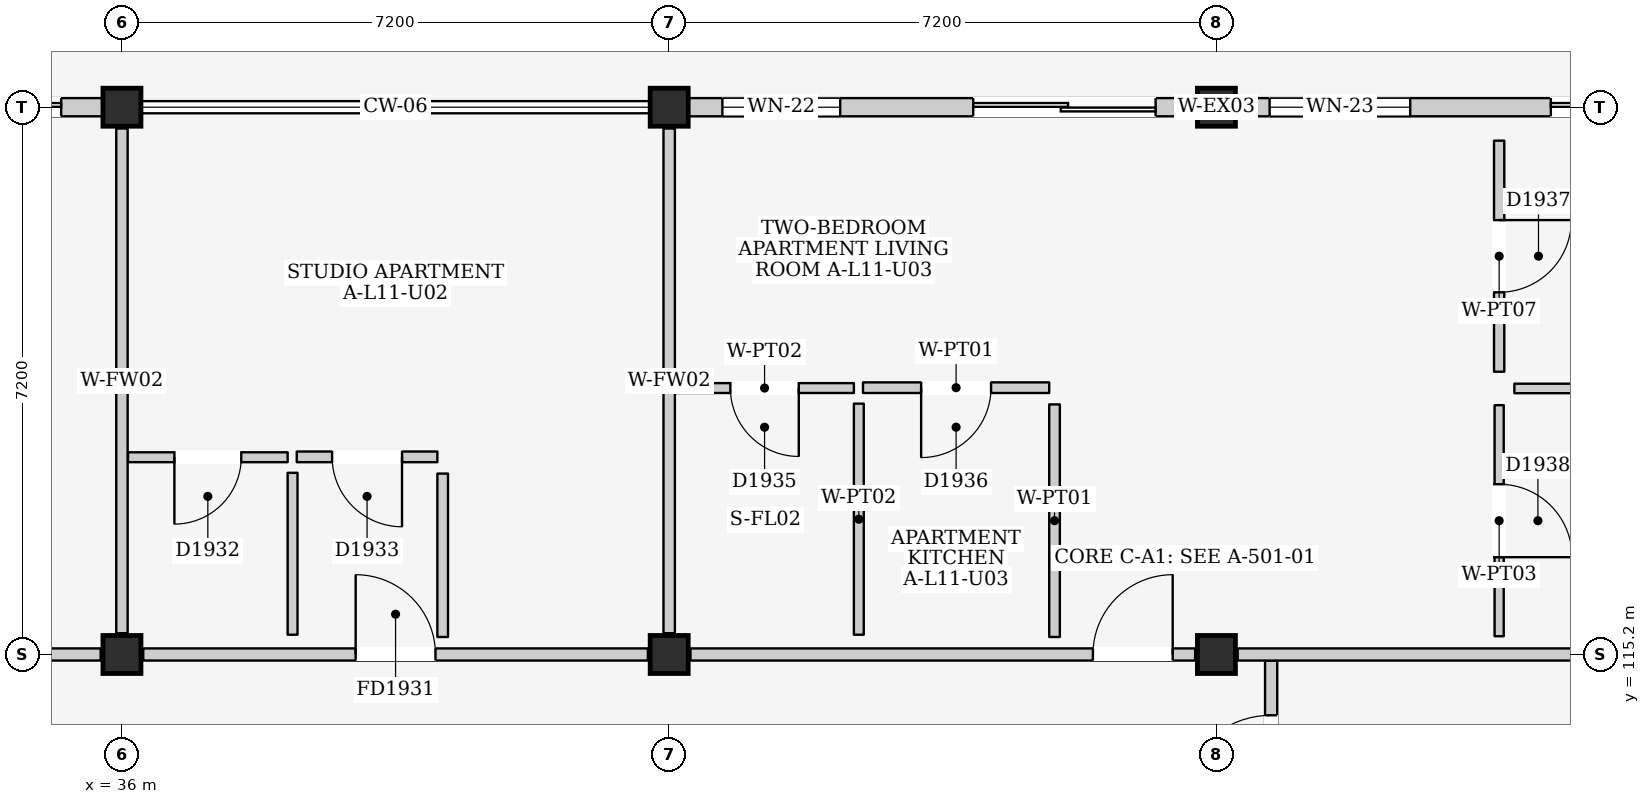
"""IFC4 building model, lengths in metres.
Left out: names, types, materials, properties, quantities, classifications, styles, units other than length and angle.
Written with IfcOpenShell. Run it as: python <this file> out.ifc"""

import sys

from ifc_helpers import new_model, si_unit, direction, frame, frame_2d, origin, origin_2d, place, context, subcontext, project, spatial, rectangle, extrude, element, fill, save


model = new_model("IFC4")
c1 = context("Model", 3, precision=1e-05, world=origin(), true_north=direction((0.0, 1.0)))
c2 = subcontext(c1, "Body", "Model", "MODEL_VIEW")
j1 = project(units=[si_unit("LENGTHUNIT", "METRE"), si_unit("PLANEANGLEUNIT", "RADIAN")], contexts=[c1])
p1 = place(None, origin())
s1 = spatial("IfcSite", under=j1, at=p1, CompositionType="ELEMENT")
p2 = place(p1, origin())
s2 = spatial("IfcBuilding", under=s1, at=p2, CompositionType="ELEMENT")
p3 = place(p2, frame((0.0, 0.0, 38.0)))
s3 = spatial("IfcBuildingStorey", under=s2, at=p3, CompositionType="ELEMENT", Elevation=38.0)
for number, where, z_axis, x_axis in (
    (1, (36.0, 115.2, 0.0), (0.0, 0.0, 1.0), (1.0, 0.0, 0.0)),
    (2, (36.0, 122.4, 0.0), (0.0, 0.0, 1.0), (1.0, 0.0, 0.0)),
    (3, (43.2, 115.2, 0.0), (0.0, 0.0, 1.0), (1.0, 0.0, 0.0)),
    (4, (43.2, 122.4, 0.0), (0.0, 0.0, 1.0), (1.0, 0.0, 0.0)),
    (5, (50.4, 115.2, 0.0), (0.0, 0.0, 1.0), (1.0, 0.0, 0.0)),
    (6, (50.4, 122.4, 0.0), (0.0, 0.0, 1.0), (1.0, 0.0, 0.0)),
):
    element("IfcColumn", number, at=place(p3, frame(where, z_axis=z_axis, x_axis=x_axis)), inside=s3, PredefinedType="COLUMN", context=c2, shape_type="SweptSolid", body=[
        extrude(rectangle(XDim=0.5, YDim=0.5, at=origin_2d()), origin(), (0.0, 0.0, 1.0), 3.2),
    ])
p4 = place(p3, frame((29.05, 122.4, 0.0), z_axis=(0.0, 0.0, 1.0), x_axis=(1.0, 0.0, 0.0)))
e7 = element("IfcWall", 7, at=p4, inside=s3, PredefinedType="ELEMENTEDWALL", context=c2, shape_type="SweptSolid", body=[
    extrude(rectangle(XDim=6.7, YDim=0.24, at=frame_2d((3.35, 0.0))), origin(), (0.0, 0.0, 1.0), 2.525),
])
p5 = place(p4, frame((4.55, 0.0, 0.0)))
e8 = element("IfcOpeningElement", 8, at=p5, cuts=e7, PredefinedType="OPENING", context=c2, shape_type="SweptSolid", body=[
    extrude(rectangle(XDim=1.6, YDim=2.12, at=frame_2d((0.8, 1.06))), frame((0.0, 0.135, 0.0), z_axis=(0.0, -1.0, 0.0), x_axis=(1.0, 0.0, 0.0)), (0.0, 0.0, 1.0), 0.27),
])
p6 = place(p4, frame((0.45, 0.0, 0.9)))
e9 = element("IfcOpeningElement", 9, at=p6, cuts=e7, PredefinedType="OPENING", context=c2, shape_type="SweptSolid", body=[
    extrude(rectangle(XDim=1.15, YDim=1.15, at=frame_2d((0.575, 0.575))), frame((0.0, 0.135, 0.0), z_axis=(0.0, -1.0, 0.0), x_axis=(1.0, 0.0, 0.0)), (0.0, 0.0, 1.0), 0.27),
])
p7 = place(p3, frame((43.45, 122.4, 0.0), z_axis=(0.0, 0.0, 1.0), x_axis=(1.0, 0.0, 0.0)))
e10 = element("IfcWall", 10, at=p7, inside=s3, PredefinedType="ELEMENTEDWALL", context=c2, shape_type="SweptSolid", body=[
    extrude(rectangle(XDim=6.7, YDim=0.24, at=frame_2d((3.35, 0.0))), origin(), (0.0, 0.0, 1.0), 2.525),
])
p8 = place(p7, frame((3.75, 0.0, 0.0)))
e11 = element("IfcOpeningElement", 11, at=p8, cuts=e10, PredefinedType="OPENING", context=c2, shape_type="SweptSolid", body=[
    extrude(rectangle(XDim=2.4, YDim=2.12, at=frame_2d((1.2, 1.06))), frame((0.0, 0.135, 0.0), z_axis=(0.0, -1.0, 0.0), x_axis=(1.0, 0.0, 0.0)), (0.0, 0.0, 1.0), 0.27),
])
p9 = place(p7, frame((0.45, 0.0, 0.9)))
e12 = element("IfcOpeningElement", 12, at=p9, cuts=e10, PredefinedType="OPENING", context=c2, shape_type="SweptSolid", body=[
    extrude(rectangle(XDim=1.55, YDim=1.45, at=frame_2d((0.775, 0.725))), frame((0.0, 0.135, 0.0), z_axis=(0.0, -1.0, 0.0), x_axis=(1.0, 0.0, 0.0)), (0.0, 0.0, 1.0), 0.27),
])
p10 = place(p3, frame((50.65, 122.4, 0.0), z_axis=(0.0, 0.0, 1.0), x_axis=(1.0, 0.0, 0.0)))
e13 = element("IfcWall", 13, at=p10, inside=s3, PredefinedType="ELEMENTEDWALL", context=c2, shape_type="SweptSolid", body=[
    extrude(rectangle(XDim=6.7, YDim=0.24, at=frame_2d((3.35, 0.0))), origin(), (0.0, 0.0, 1.0), 2.525),
])
p11 = place(p10, frame((4.15, 0.0, 0.0)))
e14 = element("IfcOpeningElement", 14, at=p11, cuts=e13, PredefinedType="OPENING", context=c2, shape_type="SweptSolid", body=[
    extrude(rectangle(XDim=2.0, YDim=2.12, at=frame_2d((1.0, 1.06))), frame((0.0, 0.135, 0.0), z_axis=(0.0, -1.0, 0.0), x_axis=(1.0, 0.0, 0.0)), (0.0, 0.0, 1.0), 0.27),
])
p12 = place(p10, frame((0.45, 0.0, 0.9)))
e15 = element("IfcOpeningElement", 15, at=p12, cuts=e13, PredefinedType="OPENING", context=c2, shape_type="SweptSolid", body=[
    extrude(rectangle(XDim=1.85, YDim=1.4, at=frame_2d((0.925, 0.7))), frame((0.0, 0.135, 0.0), z_axis=(0.0, -1.0, 0.0), x_axis=(1.0, 0.0, 0.0)), (0.0, 0.0, 1.0), 0.27),
])
p13 = place(p3, frame((51.12, 111.1, 0.0), z_axis=(0.0, 0.0, 1.0), x_axis=(0.0, 1.0, 0.0)))
e16 = element("IfcWall", 16, at=p13, inside=s3, PredefinedType="PARTITIONING", context=c2, shape_type="SweptSolid", body=[
    extrude(rectangle(XDim=4.02, YDim=0.16, at=frame_2d((2.01, 0.0))), origin(), (0.0, 0.0, 1.0), 2.99),
])
p14 = place(p13, frame((2.1, 0.0, 0.0)))
e17 = element("IfcOpeningElement", 17, at=p14, cuts=e16, PredefinedType="OPENING", context=c2, shape_type="SweptSolid", body=[
    extrude(rectangle(XDim=1.2, YDim=2.2, at=frame_2d((0.6, 1.1))), frame((0.0, 0.095, 0.0), z_axis=(0.0, -1.0, 0.0), x_axis=(1.0, 0.0, 0.0)), (0.0, 0.0, 1.0), 0.19),
])
p15 = place(p3, frame((29.08, 115.2, 0.0), z_axis=(0.0, 0.0, 1.0), x_axis=(1.0, 0.0, 0.0)))
e18 = element("IfcWall", 18, at=p15, inside=s3, PredefinedType="PARTITIONING", context=c2, shape_type="SweptSolid", body=[
    extrude(rectangle(XDim=6.64, YDim=0.16, at=frame_2d((3.32, 0.0))), origin(), (0.0, 0.0, 1.0), 2.325),
])
p16 = place(p15, frame((2.795, 0.0, 0.0)))
e19 = element("IfcOpeningElement", 19, at=p16, cuts=e18, PredefinedType="OPENING", context=c2, shape_type="SweptSolid", body=[
    extrude(rectangle(XDim=1.05, YDim=2.15, at=frame_2d((0.525, 1.075))), frame((0.0, 0.095, 0.0), z_axis=(0.0, -1.0, 0.0), x_axis=(1.0, 0.0, 0.0)), (0.0, 0.0, 1.0), 0.19),
])
p17 = place(p3, frame((36.0, 115.48, 0.0), z_axis=(0.0, 0.0, 1.0), x_axis=(0.0, 1.0, 0.0)))
e20 = element("IfcWall", 20, at=p17, inside=s3, PredefinedType="PARTITIONING", context=c2, shape_type="SweptSolid", body=[
    extrude(rectangle(XDim=6.64, YDim=0.15, at=frame_2d((3.32, 0.0))), origin(), (0.0, 0.0, 1.0), 2.475),
])
p18 = place(p3, frame((36.28, 115.2, 0.0), z_axis=(0.0, 0.0, 1.0), x_axis=(1.0, 0.0, 0.0)))
e21 = element("IfcWall", 21, at=p18, inside=s3, PredefinedType="PARTITIONING", context=c2, shape_type="SweptSolid", body=[
    extrude(rectangle(XDim=6.64, YDim=0.16, at=frame_2d((3.32, 0.0))), origin(), (0.0, 0.0, 1.0), 2.325),
])
p19 = place(p18, frame((2.795, 0.0, 0.0)))
e22 = element("IfcOpeningElement", 22, at=p19, cuts=e21, PredefinedType="OPENING", context=c2, shape_type="SweptSolid", body=[
    extrude(rectangle(XDim=1.05, YDim=2.15, at=frame_2d((0.525, 1.075))), frame((0.0, 0.095, 0.0), z_axis=(0.0, -1.0, 0.0), x_axis=(1.0, 0.0, 0.0)), (0.0, 0.0, 1.0), 0.19),
])
p20 = place(p3, frame((43.2, 115.48, 0.0), z_axis=(0.0, 0.0, 1.0), x_axis=(0.0, 1.0, 0.0)))
e23 = element("IfcWall", 23, at=p20, inside=s3, PredefinedType="PARTITIONING", context=c2, shape_type="SweptSolid", body=[
    extrude(rectangle(XDim=6.64, YDim=0.15, at=frame_2d((3.32, 0.0))), origin(), (0.0, 0.0, 1.0), 2.475),
])
p21 = place(p3, frame((36.08, 117.795, 0.0), z_axis=(0.0, 0.0, 1.0), x_axis=(1.0, 0.0, 0.0)))
e24 = element("IfcWall", 24, at=p21, inside=s3, PredefinedType="PARTITIONING", context=c2, shape_type="SweptSolid", body=[
    extrude(rectangle(XDim=2.1, YDim=0.13, at=frame_2d((1.05, 0.0))), origin(), (0.0, 0.0, 1.0), 2.99),
])
p22 = place(p21, frame((0.61, 0.0, 0.0)))
e25 = element("IfcOpeningElement", 25, at=p22, cuts=e24, PredefinedType="OPENING", context=c2, shape_type="SweptSolid", body=[
    extrude(rectangle(XDim=0.88, YDim=2.1, at=frame_2d((0.44, 1.05))), frame((0.0, 0.08, 0.0), z_axis=(0.0, -1.0, 0.0), x_axis=(1.0, 0.0, 0.0)), (0.0, 0.0, 1.0), 0.16),
])
p23 = place(p3, frame((38.245, 115.46, 0.0), z_axis=(0.0, 0.0, 1.0), x_axis=(0.0, 1.0, 0.0)))
e26 = element("IfcWall", 26, at=p23, inside=s3, PredefinedType="PARTITIONING", context=c2, shape_type="SweptSolid", body=[
    extrude(rectangle(XDim=2.13, YDim=0.13, at=frame_2d((1.065, 0.0))), origin(), (0.0, 0.0, 1.0), 2.99),
])
p24 = place(p3, frame((38.3, 117.8, 0.0), z_axis=(0.0, 0.0, 1.0), x_axis=(1.0, 0.0, 0.0)))
e27 = element("IfcWall", 27, at=p24, inside=s3, PredefinedType="PARTITIONING", context=c2, shape_type="SweptSolid", body=[
    extrude(rectangle(XDim=1.85, YDim=0.14, at=frame_2d((0.925, 0.0))), origin(), (0.0, 0.0, 1.0), 2.99),
])
p25 = place(p24, frame((0.465, 0.0, 0.0)))
e28 = element("IfcOpeningElement", 28, at=p25, cuts=e27, PredefinedType="OPENING", context=c2, shape_type="SweptSolid", body=[
    extrude(rectangle(XDim=0.92, YDim=2.1, at=frame_2d((0.46, 1.05))), frame((0.0, 0.085, 0.0), z_axis=(0.0, -1.0, 0.0), x_axis=(1.0, 0.0, 0.0)), (0.0, 0.0, 1.0), 0.17),
])
p26 = place(p3, frame((40.22, 115.43, 0.0), z_axis=(0.0, 0.0, 1.0), x_axis=(0.0, 1.0, 0.0)))
e29 = element("IfcWall", 29, at=p26, inside=s3, PredefinedType="PARTITIONING", context=c2, shape_type="SweptSolid", body=[
    extrude(rectangle(XDim=2.15, YDim=0.14, at=frame_2d((1.075, 0.0))), origin(), (0.0, 0.0, 1.0), 2.99),
])
p27 = place(p3, frame((43.48, 115.2, 0.0), z_axis=(0.0, 0.0, 1.0), x_axis=(1.0, 0.0, 0.0)))
e30 = element("IfcWall", 30, at=p27, inside=s3, PredefinedType="PARTITIONING", context=c2, shape_type="SweptSolid", body=[
    extrude(rectangle(XDim=6.64, YDim=0.16, at=frame_2d((3.32, 0.0))), origin(), (0.0, 0.0, 1.0), 2.325),
])
p28 = place(p27, frame((5.295, 0.0, 0.0)))
e31 = element("IfcOpeningElement", 31, at=p28, cuts=e30, PredefinedType="OPENING", context=c2, shape_type="SweptSolid", body=[
    extrude(rectangle(XDim=1.05, YDim=2.15, at=frame_2d((0.525, 1.075))), frame((0.0, 0.095, 0.0), z_axis=(0.0, -1.0, 0.0), x_axis=(1.0, 0.0, 0.0)), (0.0, 0.0, 1.0), 0.19),
])
p29 = place(p3, frame((50.68, 115.2, 0.0), z_axis=(0.0, 0.0, 1.0), x_axis=(1.0, 0.0, 0.0)))
e32 = element("IfcWall", 32, at=p29, inside=s3, PredefinedType="PARTITIONING", context=c2, shape_type="SweptSolid", body=[
    extrude(rectangle(XDim=6.64, YDim=0.16, at=frame_2d((3.32, 0.0))), origin(), (0.0, 0.0, 1.0), 2.325),
])
p30 = place(p3, frame((43.28, 118.705, 0.0), z_axis=(0.0, 0.0, 1.0), x_axis=(1.0, 0.0, 0.0)))
e33 = element("IfcWall", 33, at=p30, inside=s3, PredefinedType="PARTITIONING", context=c2, shape_type="SweptSolid", body=[
    extrude(rectangle(XDim=2.35, YDim=0.13, at=frame_2d((1.175, 0.0))), origin(), (0.0, 0.0, 1.0), 2.99),
])
p31 = place(p30, frame((0.725, 0.0, 0.0)))
e34 = element("IfcOpeningElement", 34, at=p31, cuts=e33, PredefinedType="OPENING", context=c2, shape_type="SweptSolid", body=[
    extrude(rectangle(XDim=0.9, YDim=2.1, at=frame_2d((0.45, 1.05))), frame((0.0, 0.08, 0.0), z_axis=(0.0, -1.0, 0.0), x_axis=(1.0, 0.0, 0.0)), (0.0, 0.0, 1.0), 0.16),
])
p32 = place(p3, frame((45.695, 115.46, 0.0), z_axis=(0.0, 0.0, 1.0), x_axis=(0.0, 1.0, 0.0)))
e35 = element("IfcWall", 35, at=p32, inside=s3, PredefinedType="PARTITIONING", context=c2, shape_type="SweptSolid", body=[
    extrude(rectangle(XDim=3.04, YDim=0.13, at=frame_2d((1.52, 0.0))), origin(), (0.0, 0.0, 1.0), 2.99),
])
p33 = place(p3, frame((45.75, 118.71, 0.0), z_axis=(0.0, 0.0, 1.0), x_axis=(1.0, 0.0, 0.0)))
e36 = element("IfcWall", 36, at=p33, inside=s3, PredefinedType="PARTITIONING", context=c2, shape_type="SweptSolid", body=[
    extrude(rectangle(XDim=2.45, YDim=0.14, at=frame_2d((1.225, 0.0))), origin(), (0.0, 0.0, 1.0), 2.99),
])
p34 = place(p33, frame((0.765, 0.0, 0.0)))
e37 = element("IfcOpeningElement", 37, at=p34, cuts=e36, PredefinedType="OPENING", context=c2, shape_type="SweptSolid", body=[
    extrude(rectangle(XDim=0.92, YDim=2.1, at=frame_2d((0.46, 1.05))), frame((0.0, 0.085, 0.0), z_axis=(0.0, -1.0, 0.0), x_axis=(1.0, 0.0, 0.0)), (0.0, 0.0, 1.0), 0.17),
])
p35 = place(p3, frame((48.27, 115.43, 0.0), z_axis=(0.0, 0.0, 1.0), x_axis=(0.0, 1.0, 0.0)))
e38 = element("IfcWall", 38, at=p35, inside=s3, PredefinedType="PARTITIONING", context=c2, shape_type="SweptSolid", body=[
    extrude(rectangle(XDim=3.06, YDim=0.14, at=frame_2d((1.53, 0.0))), origin(), (0.0, 0.0, 1.0), 2.99),
])
p36 = place(p3, frame((54.12, 118.92, 0.0), z_axis=(0.0, 0.0, 1.0), x_axis=(0.0, 1.0, 0.0)))
e39 = element("IfcWall", 39, at=p36, inside=s3, PredefinedType="PARTITIONING", context=c2, shape_type="SweptSolid", body=[
    extrude(rectangle(XDim=3.04, YDim=0.135, at=frame_2d((1.52, 0.0))), origin(), (0.0, 0.0, 1.0), 2.99),
])
p37 = place(p36, frame((1.045, 0.0, 0.0)))
e40 = element("IfcOpeningElement", 40, at=p37, cuts=e39, PredefinedType="OPENING", context=c2, shape_type="SweptSolid", body=[
    extrude(rectangle(XDim=0.95, YDim=2.15, at=frame_2d((0.475, 1.075))), frame((0.0, 0.083, 0.0), z_axis=(0.0, -1.0, 0.0), x_axis=(1.0, 0.0, 0.0)), (0.0, 0.0, 1.0), 0.165),
])
p38 = place(p3, frame((54.32, 118.7, 0.0), z_axis=(0.0, 0.0, 1.0), x_axis=(1.0, 0.0, 0.0)))
e41 = element("IfcWall", 41, at=p38, inside=s3, PredefinedType="PARTITIONING", context=c2, shape_type="SweptSolid", body=[
    extrude(rectangle(XDim=3.06, YDim=0.125, at=frame_2d((1.53, 0.0))), origin(), (0.0, 0.0, 1.0), 2.99),
])
p39 = place(p3, frame((54.12, 115.44, 0.0), z_axis=(0.0, 0.0, 1.0), x_axis=(0.0, 1.0, 0.0)))
e42 = element("IfcWall", 42, at=p39, inside=s3, PredefinedType="PARTITIONING", context=c2, shape_type="SweptSolid", body=[
    extrude(rectangle(XDim=3.04, YDim=0.12, at=frame_2d((1.52, 0.0))), origin(), (0.0, 0.0, 1.0), 2.99),
])
p40 = place(p39, frame((1.04, 0.0, 0.0)))
e43 = element("IfcOpeningElement", 43, at=p40, cuts=e42, PredefinedType="OPENING", context=c2, shape_type="SweptSolid", body=[
    extrude(rectangle(XDim=0.96, YDim=2.15, at=frame_2d((0.48, 1.075))), frame((0.0, 0.075, 0.0), z_axis=(0.0, -1.0, 0.0), x_axis=(1.0, 0.0, 0.0)), (0.0, 0.0, 1.0), 0.15),
])
p41 = place(p5, frame((1.6, 0.0, 0.0), z_axis=(0.0, 0.0, 1.0), x_axis=(-1.0, 0.0, 0.0)))
e44 = element("IfcDoor", 44, at=p41, inside=s3, OperationType="SLIDING_TO_RIGHT", PredefinedType="DOOR", context=c2, shape_type="SweptSolid", body=[
    extrude(rectangle(XDim=1.6, YDim=2.12, at=frame_2d((0.8, 1.06))), frame((0.0, 0.025, 0.0), z_axis=(0.0, -1.0, 0.0), x_axis=(1.0, 0.0, 0.0)), (0.0, 0.0, 1.0), 0.05),
])
fill(e8, e44)
p42 = place(p8, frame((2.4, 0.0, 0.0), z_axis=(0.0, 0.0, 1.0), x_axis=(-1.0, 0.0, 0.0)))
e45 = element("IfcDoor", 45, at=p42, inside=s3, OperationType="DOUBLE_DOOR_SLIDING", PredefinedType="DOOR", context=c2, shape_type="SweptSolid", body=[
    extrude(rectangle(XDim=2.4, YDim=2.12, at=frame_2d((1.2, 1.06))), frame((0.0, 0.025, 0.0), z_axis=(0.0, -1.0, 0.0), x_axis=(1.0, 0.0, 0.0)), (0.0, 0.0, 1.0), 0.05),
])
fill(e11, e45)
p43 = place(p9, origin())
e46 = element("IfcWindow", 46, at=p43, inside=s3, PartitioningType="DOUBLE_PANEL_VERTICAL", PredefinedType="WINDOW", context=c2, shape_type="SweptSolid", body=[
    extrude(rectangle(XDim=1.55, YDim=1.45, at=frame_2d((0.775, 0.725))), frame((0.0, 0.03, 0.0), z_axis=(0.0, -1.0, 0.0), x_axis=(1.0, 0.0, 0.0)), (0.0, 0.0, 1.0), 0.06),
])
fill(e12, e46)
p44 = place(p11, frame((2.0, 0.0, 0.0), z_axis=(0.0, 0.0, 1.0), x_axis=(-1.0, 0.0, 0.0)))
e47 = element("IfcDoor", 47, at=p44, inside=s3, OperationType="DOUBLE_DOOR_SLIDING", PredefinedType="DOOR", context=c2, shape_type="SweptSolid", body=[
    extrude(rectangle(XDim=2.0, YDim=2.12, at=frame_2d((1.0, 1.06))), frame((0.0, 0.025, 0.0), z_axis=(0.0, -1.0, 0.0), x_axis=(1.0, 0.0, 0.0)), (0.0, 0.0, 1.0), 0.05),
])
fill(e14, e47)
p45 = place(p12, origin())
e48 = element("IfcWindow", 48, at=p45, inside=s3, PartitioningType="DOUBLE_PANEL_VERTICAL", PredefinedType="WINDOW", context=c2, shape_type="SweptSolid", body=[
    extrude(rectangle(XDim=1.85, YDim=1.4, at=frame_2d((0.925, 0.7))), frame((0.0, 0.03, 0.0), z_axis=(0.0, -1.0, 0.0), x_axis=(1.0, 0.0, 0.0)), (0.0, 0.0, 1.0), 0.06),
])
fill(e15, e48)
p46 = place(p14, origin())
e49 = element("IfcDoor", 49, at=p46, inside=s3, OperationType="SINGLE_SWING_LEFT", PredefinedType="DOOR", context=c2, shape_type="SweptSolid", body=[
    extrude(rectangle(XDim=1.2, YDim=2.2, at=frame_2d((0.6, 1.1))), frame((0.0, 0.025, 0.0), z_axis=(0.0, -1.0, 0.0), x_axis=(1.0, 0.0, 0.0)), (0.0, 0.0, 1.0), 0.05),
])
fill(e17, e49)
p47 = place(p19, origin())
e50 = element("IfcDoor", 50, at=p47, inside=s3, OperationType="SINGLE_SWING_LEFT", PredefinedType="DOOR", context=c2, shape_type="SweptSolid", body=[
    extrude(rectangle(XDim=1.05, YDim=2.15, at=frame_2d((0.525, 1.075))), frame((0.0, 0.025, 0.0), z_axis=(0.0, -1.0, 0.0), x_axis=(1.0, 0.0, 0.0)), (0.0, 0.0, 1.0), 0.05),
])
fill(e22, e50)
p48 = place(p22, frame((0.88, 0.0, 0.0), z_axis=(0.0, 0.0, 1.0), x_axis=(-1.0, 0.0, 0.0)))
e51 = element("IfcDoor", 51, at=p48, inside=s3, OperationType="SINGLE_SWING_RIGHT", PredefinedType="DOOR", context=c2, shape_type="SweptSolid", body=[
    extrude(rectangle(XDim=0.88, YDim=2.1, at=frame_2d((0.44, 1.05))), frame((0.0, 0.025, 0.0), z_axis=(0.0, -1.0, 0.0), x_axis=(1.0, 0.0, 0.0)), (0.0, 0.0, 1.0), 0.05),
])
fill(e25, e51)
p49 = place(p25, frame((0.92, 0.0, 0.0), z_axis=(0.0, 0.0, 1.0), x_axis=(-1.0, 0.0, 0.0)))
e52 = element("IfcDoor", 52, at=p49, inside=s3, OperationType="SINGLE_SWING_LEFT", PredefinedType="DOOR", context=c2, shape_type="SweptSolid", body=[
    extrude(rectangle(XDim=0.92, YDim=2.1, at=frame_2d((0.46, 1.05))), frame((0.0, 0.025, 0.0), z_axis=(0.0, -1.0, 0.0), x_axis=(1.0, 0.0, 0.0)), (0.0, 0.0, 1.0), 0.05),
])
fill(e28, e52)
p50 = place(p28, origin())
e53 = element("IfcDoor", 53, at=p50, inside=s3, OperationType="SINGLE_SWING_RIGHT", PredefinedType="DOOR", context=c2, shape_type="SweptSolid", body=[
    extrude(rectangle(XDim=1.05, YDim=2.15, at=frame_2d((0.525, 1.075))), frame((0.0, 0.025, 0.0), z_axis=(0.0, -1.0, 0.0), x_axis=(1.0, 0.0, 0.0)), (0.0, 0.0, 1.0), 0.05),
])
fill(e31, e53)
p51 = place(p31, frame((0.9, 0.0, 0.0), z_axis=(0.0, 0.0, 1.0), x_axis=(-1.0, 0.0, 0.0)))
e54 = element("IfcDoor", 54, at=p51, inside=s3, OperationType="SINGLE_SWING_LEFT", PredefinedType="DOOR", context=c2, shape_type="SweptSolid", body=[
    extrude(rectangle(XDim=0.9, YDim=2.1, at=frame_2d((0.45, 1.05))), frame((0.0, 0.025, 0.0), z_axis=(0.0, -1.0, 0.0), x_axis=(1.0, 0.0, 0.0)), (0.0, 0.0, 1.0), 0.05),
])
fill(e34, e54)
p52 = place(p34, frame((0.92, 0.0, 0.0), z_axis=(0.0, 0.0, 1.0), x_axis=(-1.0, 0.0, 0.0)))
e55 = element("IfcDoor", 55, at=p52, inside=s3, OperationType="SINGLE_SWING_RIGHT", PredefinedType="DOOR", context=c2, shape_type="SweptSolid", body=[
    extrude(rectangle(XDim=0.92, YDim=2.1, at=frame_2d((0.46, 1.05))), frame((0.0, 0.025, 0.0), z_axis=(0.0, -1.0, 0.0), x_axis=(1.0, 0.0, 0.0)), (0.0, 0.0, 1.0), 0.05),
])
fill(e37, e55)
p53 = place(p37, frame((0.95, 0.0, 0.0), z_axis=(0.0, 0.0, 1.0), x_axis=(-1.0, 0.0, 0.0)))
e56 = element("IfcDoor", 56, at=p53, inside=s3, OperationType="SINGLE_SWING_LEFT", PredefinedType="DOOR", context=c2, shape_type="SweptSolid", body=[
    extrude(rectangle(XDim=0.95, YDim=2.15, at=frame_2d((0.475, 1.075))), frame((0.0, 0.025, 0.0), z_axis=(0.0, -1.0, 0.0), x_axis=(1.0, 0.0, 0.0)), (0.0, 0.0, 1.0), 0.05),
])
fill(e40, e56)
p54 = place(p40, frame((0.96, 0.0, 0.0), z_axis=(0.0, 0.0, 1.0), x_axis=(-1.0, 0.0, 0.0)))
e57 = element("IfcDoor", 57, at=p54, inside=s3, OperationType="SINGLE_SWING_RIGHT", PredefinedType="DOOR", context=c2, shape_type="SweptSolid", body=[
    extrude(rectangle(XDim=0.96, YDim=2.15, at=frame_2d((0.48, 1.075))), frame((0.0, 0.025, 0.0), z_axis=(0.0, -1.0, 0.0), x_axis=(1.0, 0.0, 0.0)), (0.0, 0.0, 1.0), 0.05),
])
fill(e43, e57)
save(model, sys.argv[1])
